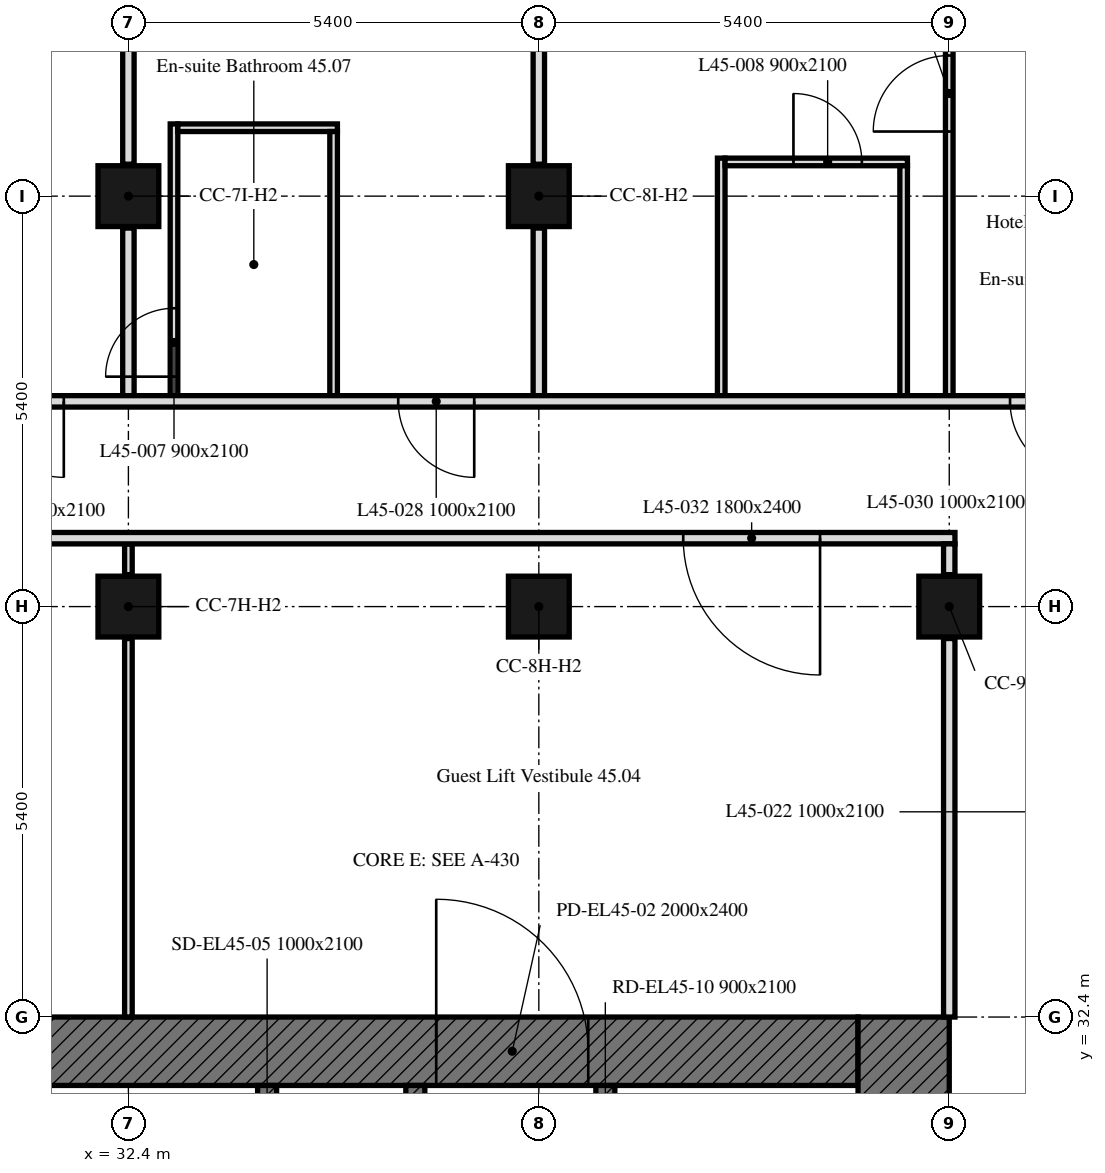
"""IFC4 building model, lengths in metres.
Left out: names, types, materials, properties, quantities, classifications, styles, units other than length and angle.
Written with IfcOpenShell. Run it as: python <this file> out.ifc"""

import sys

from ifc_helpers import new_model, si_unit, direction, frame, frame_2d, origin, origin_2d, place, context, subcontext, project, spatial, rectangle, extrude, element, fill, save


model = new_model("IFC4")
c1 = context("Model", 3, precision=1e-05, world=origin(), true_north=direction((0.0, 1.0)))
c2 = subcontext(c1, "Body", "Model", "MODEL_VIEW")
j1 = project(units=[si_unit("LENGTHUNIT", "METRE"), si_unit("PLANEANGLEUNIT", "RADIAN")], contexts=[c1])
p1 = place(None, origin())
s1 = spatial("IfcSite", under=j1, at=p1, CompositionType="ELEMENT")
p2 = place(p1, origin())
s2 = spatial("IfcBuilding", under=s1, at=p2, CompositionType="ELEMENT")
p3 = place(p2, frame((0.0, 0.0, 187.3)))
s3 = spatial("IfcBuildingStorey", under=s2, at=p3, CompositionType="ELEMENT", Elevation=187.3)
for number, where, z_axis, x_axis in (
    (1, (32.4, 37.8, 0.0), (0.0, 0.0, 1.0), (1.0, 0.0, 0.0)),
    (2, (37.8, 37.8, 0.0), (0.0, 0.0, 1.0), (1.0, 0.0, 0.0)),
    (3, (43.2, 37.8, 0.0), (0.0, 0.0, 1.0), (1.0, 0.0, 0.0)),
    (4, (32.4, 43.2, 0.0), (0.0, 0.0, 1.0), (1.0, 0.0, 0.0)),
    (5, (37.8, 43.2, 0.0), (0.0, 0.0, 1.0), (1.0, 0.0, 0.0)),
):
    element("IfcColumn", number, at=place(p3, frame(where, z_axis=z_axis, x_axis=x_axis)), inside=s3, PredefinedType="COLUMN", context=c2, shape_type="SweptSolid", body=[
        extrude(rectangle(XDim=0.8, YDim=0.8, at=origin_2d()), origin(), (0.0, 0.0, 1.0), 3.0),
    ])
p4 = place(p3, frame((47.901, 43.051, 0.0), z_axis=(0.0, 0.0, 1.0), x_axis=(-0.707106781187, 0.707106781187, 0.0)))
e6 = element("IfcWall", 6, at=p4, inside=s3, PredefinedType="SOLIDWALL", context=c2, shape_type="SweptSolid", body=[
    extrude(rectangle(XDim=6.86, YDim=0.3, at=frame_2d((3.43, 0.0))), origin(), (0.0, 0.0, 1.0), 3.0),
])
p5 = place(p4, frame((1.73, 0.0, 0.9)))
e7 = element("IfcOpeningElement", 7, at=p5, cuts=e6, PredefinedType="OPENING", context=c2, shape_type="SweptSolid", body=[
    extrude(rectangle(XDim=3.4, YDim=1.7, at=frame_2d((1.7, 0.85))), frame((0.0, 0.16, 0.0), z_axis=(0.0, -1.0, 0.0), x_axis=(1.0, 0.0, 0.0)), (0.0, 0.0, 1.0), 0.32),
])
p6 = place(p3, frame((30.9, 31.95, 0.0), z_axis=(0.0, 0.0, 1.0), x_axis=(1.0, 0.0, 0.0)))
e8 = element("IfcWall", 8, at=p6, inside=s3, PredefinedType="SOLIDWALL", context=c2, shape_type="SweptSolid", body=[
    extrude(rectangle(XDim=11.1, YDim=0.9, at=frame_2d((5.55, 0.0))), origin(), (0.0, 0.0, 1.0), 3.0),
])
p7 = place(p6, frame((5.55, 0.0, 0.0)))
e9 = element("IfcOpeningElement", 9, at=p7, cuts=e8, PredefinedType="OPENING", context=c2, shape_type="SweptSolid", body=[
    extrude(rectangle(XDim=2.0, YDim=2.4, at=frame_2d((1.0, 1.2))), frame((0.0, 0.45, 0.0), z_axis=(0.0, -1.0, 0.0), x_axis=(1.0, 0.0, 0.0)), (0.0, 0.0, 1.0), 0.9),
])
p8 = place(p3, frame((42.6, 32.4, 0.0), z_axis=(0.0, 0.0, 1.0), x_axis=(0.0, -1.0, 0.0)))
e10 = element("IfcWall", 10, at=p8, inside=s3, PredefinedType="SOLIDWALL", context=c2, shape_type="SweptSolid", body=[
    extrude(rectangle(XDim=16.2, YDim=1.2, at=frame_2d((8.1, 0.0))), origin(), (0.0, 0.0, 1.0), 3.0),
])
p9 = place(p3, frame((38.675, 17.1, 0.0), z_axis=(0.0, 0.0, 1.0), x_axis=(0.0, 1.0, 0.0)))
e11 = element("IfcWall", 11, at=p9, inside=s3, PredefinedType="SOLIDWALL", context=c2, shape_type="SweptSolid", body=[
    extrude(rectangle(XDim=14.4, YDim=0.25, at=frame_2d((7.2, 0.0))), origin(), (0.0, 0.0, 1.0), 3.0),
])
p10 = place(p9, frame((4.6, 0.0, 0.0)))
e12 = element("IfcOpeningElement", 12, at=p10, cuts=e11, PredefinedType="OPENING", context=c2, shape_type="SweptSolid", body=[
    extrude(rectangle(XDim=1.0, YDim=2.1, at=frame_2d((0.5, 1.05))), frame((0.0, 0.125, 0.0), z_axis=(0.0, -1.0, 0.0), x_axis=(1.0, 0.0, 0.0)), (0.0, 0.0, 1.0), 0.25),
])
p11 = place(p9, frame((7.062, 0.0, 0.0)))
e13 = element("IfcOpeningElement", 13, at=p11, cuts=e11, PredefinedType="OPENING", context=c2, shape_type="SweptSolid", body=[
    extrude(rectangle(XDim=1.2, YDim=2.1, at=frame_2d((0.6, 1.05))), frame((0.0, 0.125, 0.0), z_axis=(0.0, -1.0, 0.0), x_axis=(1.0, 0.0, 0.0)), (0.0, 0.0, 1.0), 0.25),
])
p12 = place(p9, frame((10.36, 0.0, 0.0)))
e14 = element("IfcOpeningElement", 14, at=p12, cuts=e11, PredefinedType="OPENING", context=c2, shape_type="SweptSolid", body=[
    extrude(rectangle(XDim=0.9, YDim=2.1, at=frame_2d((0.45, 1.05))), frame((0.0, 0.125, 0.0), z_axis=(0.0, -1.0, 0.0), x_axis=(1.0, 0.0, 0.0)), (0.0, 0.0, 1.0), 0.25),
])
p13 = place(p9, frame((12.972, 0.0, 0.0)))
e15 = element("IfcOpeningElement", 15, at=p13, cuts=e11, PredefinedType="OPENING", context=c2, shape_type="SweptSolid", body=[
    extrude(rectangle(XDim=0.9, YDim=2.1, at=frame_2d((0.45, 1.05))), frame((0.0, 0.125, 0.0), z_axis=(0.0, -1.0, 0.0), x_axis=(1.0, 0.0, 0.0)), (0.0, 0.0, 1.0), 0.25),
])
p14 = place(p3, frame((34.225, 17.1, 0.0), z_axis=(0.0, 0.0, 1.0), x_axis=(0.0, 1.0, 0.0)))
e16 = element("IfcWall", 16, at=p14, inside=s3, PredefinedType="SOLIDWALL", context=c2, shape_type="SweptSolid", body=[
    extrude(rectangle(XDim=14.4, YDim=0.25, at=frame_2d((7.2, 0.0))), origin(), (0.0, 0.0, 1.0), 3.0),
])
p15 = place(p14, frame((13.15, 0.0, 0.0)))
e17 = element("IfcOpeningElement", 17, at=p15, cuts=e16, PredefinedType="OPENING", context=c2, shape_type="SweptSolid", body=[
    extrude(rectangle(XDim=1.0, YDim=2.1, at=frame_2d((0.5, 1.05))), frame((0.0, 0.125, 0.0), z_axis=(0.0, -1.0, 0.0), x_axis=(1.0, 0.0, 0.0)), (0.0, 0.0, 1.0), 0.25),
])
p16 = place(p14, frame((0.6, 0.0, 0.0)))
e18 = element("IfcOpeningElement", 18, at=p16, cuts=e16, PredefinedType="OPENING", context=c2, shape_type="SweptSolid", body=[
    extrude(rectangle(XDim=1.1, YDim=2.1, at=frame_2d((0.55, 1.05))), frame((0.0, 0.125, 0.0), z_axis=(0.0, -1.0, 0.0), x_axis=(1.0, 0.0, 0.0)), (0.0, 0.0, 1.0), 0.25),
])
p17 = place(p14, frame((3.25, 0.0, 0.0)))
e19 = element("IfcOpeningElement", 19, at=p17, cuts=e16, PredefinedType="OPENING", context=c2, shape_type="SweptSolid", body=[
    extrude(rectangle(XDim=0.9, YDim=2.1, at=frame_2d((0.45, 1.05))), frame((0.0, 0.125, 0.0), z_axis=(0.0, -1.0, 0.0), x_axis=(1.0, 0.0, 0.0)), (0.0, 0.0, 1.0), 0.25),
])
p18 = place(p3, frame((36.175, 29.4, 0.0), z_axis=(0.0, 0.0, 1.0), x_axis=(0.0, 1.0, 0.0)))
e20 = element("IfcWall", 20, at=p18, inside=s3, PredefinedType="SOLIDWALL", context=c2, shape_type="SweptSolid", body=[
    extrude(rectangle(XDim=2.1, YDim=0.25, at=frame_2d((1.05, 0.0))), origin(), (0.0, 0.0, 1.0), 3.0),
])
p19 = place(p18, frame((0.5, 0.0, 0.0)))
e21 = element("IfcOpeningElement", 21, at=p19, cuts=e20, PredefinedType="OPENING", context=c2, shape_type="SweptSolid", body=[
    extrude(rectangle(XDim=1.0, YDim=2.1, at=frame_2d((0.5, 1.05))), frame((0.0, 0.125, 0.0), z_axis=(0.0, -1.0, 0.0), x_axis=(1.0, 0.0, 0.0)), (0.0, 0.0, 1.0), 0.25),
])
p20 = place(p3, frame((32.4, 40.575, 0.0), z_axis=(0.0, 0.0, 1.0), x_axis=(0.0, 1.0, 0.0)))
e22 = element("IfcWall", 22, at=p20, inside=s3, PredefinedType="PARTITIONING", context=c2, shape_type="SweptSolid", body=[
    extrude(rectangle(XDim=2.205, YDim=0.15, at=frame_2d((1.103, 0.0))), origin(), (0.0, 0.0, 1.0), 2.4),
])
p21 = place(p3, frame((32.4, 43.62, 0.0), z_axis=(0.0, 0.0, 1.0), x_axis=(0.0, 1.0, 0.0)))
e23 = element("IfcWall", 23, at=p21, inside=s3, PredefinedType="PARTITIONING", context=c2, shape_type="SweptSolid", body=[
    extrude(rectangle(XDim=4.229, YDim=0.15, at=frame_2d((2.115, 0.0))), origin(), (0.0, 0.0, 1.0), 2.4),
])
p22 = place(p3, frame((33.0, 40.575, 0.0), z_axis=(0.0, 0.0, 1.0), x_axis=(0.0, 1.0, 0.0)))
e24 = element("IfcWall", 24, at=p22, inside=s3, PredefinedType="PARTITIONING", context=c2, shape_type="SweptSolid", body=[
    extrude(rectangle(XDim=3.575, YDim=0.1, at=frame_2d((1.788, 0.0))), origin(), (0.0, 0.0, 1.0), 3.0),
])
p23 = place(p22, frame((0.25, 0.0, 0.0)))
e25 = element("IfcOpeningElement", 25, at=p23, cuts=e24, PredefinedType="OPENING", context=c2, shape_type="SweptSolid", body=[
    extrude(rectangle(XDim=0.9, YDim=2.1, at=frame_2d((0.45, 1.05))), frame((0.0, 0.05, 0.0), z_axis=(0.0, -1.0, 0.0), x_axis=(1.0, 0.0, 0.0)), (0.0, 0.0, 1.0), 0.1),
])
p24 = place(p3, frame((33.05, 44.1, 0.0), z_axis=(0.0, 0.0, 1.0), x_axis=(1.0, 0.0, 0.0)))
e26 = element("IfcWall", 26, at=p24, inside=s3, PredefinedType="PARTITIONING", context=c2, shape_type="SweptSolid", body=[
    extrude(rectangle(XDim=2.1, YDim=0.1, at=frame_2d((1.05, 0.0))), origin(), (0.0, 0.0, 1.0), 3.0),
])
p25 = place(p3, frame((35.1, 44.05, 0.0), z_axis=(0.0, 0.0, 1.0), x_axis=(0.0, -1.0, 0.0)))
e27 = element("IfcWall", 27, at=p25, inside=s3, PredefinedType="PARTITIONING", context=c2, shape_type="SweptSolid", body=[
    extrude(rectangle(XDim=3.475, YDim=0.1, at=frame_2d((1.738, 0.0))), origin(), (0.0, 0.0, 1.0), 3.0),
])
p26 = place(p3, frame((37.8, 40.575, 0.0), z_axis=(0.0, 0.0, 1.0), x_axis=(0.0, 1.0, 0.0)))
e28 = element("IfcWall", 28, at=p26, inside=s3, PredefinedType="PARTITIONING", context=c2, shape_type="SweptSolid", body=[
    extrude(rectangle(XDim=2.205, YDim=0.15, at=frame_2d((1.103, 0.0))), origin(), (0.0, 0.0, 1.0), 2.4),
])
p27 = place(p3, frame((37.8, 43.62, 0.0), z_axis=(0.0, 0.0, 1.0), x_axis=(0.0, 1.0, 0.0)))
e29 = element("IfcWall", 29, at=p27, inside=s3, PredefinedType="PARTITIONING", context=c2, shape_type="SweptSolid", body=[
    extrude(rectangle(XDim=4.229, YDim=0.15, at=frame_2d((2.115, 0.0))), origin(), (0.0, 0.0, 1.0), 2.4),
])
p28 = place(p3, frame((40.2, 40.575, 0.0), z_axis=(0.0, 0.0, 1.0), x_axis=(0.0, 1.0, 0.0)))
e30 = element("IfcWall", 30, at=p28, inside=s3, PredefinedType="PARTITIONING", context=c2, shape_type="SweptSolid", body=[
    extrude(rectangle(XDim=3.125, YDim=0.1, at=frame_2d((1.562, 0.0))), origin(), (0.0, 0.0, 1.0), 3.0),
])
p29 = place(p3, frame((40.25, 43.65, 0.0), z_axis=(0.0, 0.0, 1.0), x_axis=(1.0, 0.0, 0.0)))
e31 = element("IfcWall", 31, at=p29, inside=s3, PredefinedType="PARTITIONING", context=c2, shape_type="SweptSolid", body=[
    extrude(rectangle(XDim=2.4, YDim=0.1, at=frame_2d((1.2, 0.0))), origin(), (0.0, 0.0, 1.0), 3.0),
])
p30 = place(p29, frame((0.9, 0.0, 0.0)))
e32 = element("IfcOpeningElement", 32, at=p30, cuts=e31, PredefinedType="OPENING", context=c2, shape_type="SweptSolid", body=[
    extrude(rectangle(XDim=0.9, YDim=2.1, at=frame_2d((0.45, 1.05))), frame((0.0, 0.05, 0.0), z_axis=(0.0, -1.0, 0.0), x_axis=(1.0, 0.0, 0.0)), (0.0, 0.0, 1.0), 0.1),
])
p31 = place(p3, frame((42.6, 43.6, 0.0), z_axis=(0.0, 0.0, 1.0), x_axis=(0.0, -1.0, 0.0)))
e33 = element("IfcWall", 33, at=p31, inside=s3, PredefinedType="PARTITIONING", context=c2, shape_type="SweptSolid", body=[
    extrude(rectangle(XDim=3.025, YDim=0.1, at=frame_2d((1.513, 0.0))), origin(), (0.0, 0.0, 1.0), 3.0),
])
p32 = place(p3, frame((43.2, 40.575, 0.0), z_axis=(0.0, 0.0, 1.0), x_axis=(0.0, 1.0, 0.0)))
e34 = element("IfcWall", 34, at=p32, inside=s3, PredefinedType="PARTITIONING", context=c2, shape_type="SweptSolid", body=[
    extrude(rectangle(XDim=6.913, YDim=0.1, at=frame_2d((3.457, 0.0))), origin(), (0.0, 0.0, 1.0), 3.0),
])
p33 = place(p32, frame((3.475, 0.0, 0.0)))
e35 = element("IfcOpeningElement", 35, at=p33, cuts=e34, PredefinedType="OPENING", context=c2, shape_type="SweptSolid", body=[
    extrude(rectangle(XDim=1.0, YDim=2.1, at=frame_2d((0.5, 1.05))), frame((0.0, 0.05, 0.0), z_axis=(0.0, -1.0, 0.0), x_axis=(1.0, 0.0, 0.0)), (0.0, 0.0, 1.0), 0.1),
])
p34 = place(p3, frame((47.849, 40.5, 0.0), z_axis=(0.0, 0.0, 1.0), x_axis=(-1.0, 0.0, 0.0)))
e36 = element("IfcWall", 36, at=p34, inside=s3, PredefinedType="PARTITIONING", context=c2, shape_type="SweptSolid", body=[
    extrude(rectangle(XDim=41.698, YDim=0.15, at=frame_2d((20.849, 0.0))), origin(), (0.0, 0.0, 1.0), 2.4),
])
p35 = place(p34, frame((37.899, 0.0, 0.0)))
e37 = element("IfcOpeningElement", 37, at=p35, cuts=e36, PredefinedType="OPENING", context=c2, shape_type="SweptSolid", body=[
    extrude(rectangle(XDim=1.0, YDim=2.1, at=frame_2d((0.5, 1.05))), frame((0.0, 0.075, 0.0), z_axis=(0.0, -1.0, 0.0), x_axis=(1.0, 0.0, 0.0)), (0.0, 0.0, 1.0), 0.15),
])
p36 = place(p34, frame((32.499, 0.0, 0.0)))
e38 = element("IfcOpeningElement", 38, at=p36, cuts=e36, PredefinedType="OPENING", context=c2, shape_type="SweptSolid", body=[
    extrude(rectangle(XDim=1.0, YDim=2.1, at=frame_2d((0.5, 1.05))), frame((0.0, 0.075, 0.0), z_axis=(0.0, -1.0, 0.0), x_axis=(1.0, 0.0, 0.0)), (0.0, 0.0, 1.0), 0.15),
])
p37 = place(p34, frame((27.099, 0.0, 0.0)))
e39 = element("IfcOpeningElement", 39, at=p37, cuts=e36, PredefinedType="OPENING", context=c2, shape_type="SweptSolid", body=[
    extrude(rectangle(XDim=1.0, YDim=2.1, at=frame_2d((0.5, 1.05))), frame((0.0, 0.075, 0.0), z_axis=(0.0, -1.0, 0.0), x_axis=(1.0, 0.0, 0.0)), (0.0, 0.0, 1.0), 0.15),
])
p38 = place(p34, frame((21.699, 0.0, 0.0)))
e40 = element("IfcOpeningElement", 40, at=p38, cuts=e36, PredefinedType="OPENING", context=c2, shape_type="SweptSolid", body=[
    extrude(rectangle(XDim=1.0, YDim=2.1, at=frame_2d((0.5, 1.05))), frame((0.0, 0.075, 0.0), z_axis=(0.0, -1.0, 0.0), x_axis=(1.0, 0.0, 0.0)), (0.0, 0.0, 1.0), 0.15),
])
p39 = place(p34, frame((16.299, 0.0, 0.0)))
e41 = element("IfcOpeningElement", 41, at=p39, cuts=e36, PredefinedType="OPENING", context=c2, shape_type="SweptSolid", body=[
    extrude(rectangle(XDim=1.0, YDim=2.1, at=frame_2d((0.5, 1.05))), frame((0.0, 0.075, 0.0), z_axis=(0.0, -1.0, 0.0), x_axis=(1.0, 0.0, 0.0)), (0.0, 0.0, 1.0), 0.15),
])
p40 = place(p34, frame((10.899, 0.0, 0.0)))
e42 = element("IfcOpeningElement", 42, at=p40, cuts=e36, PredefinedType="OPENING", context=c2, shape_type="SweptSolid", body=[
    extrude(rectangle(XDim=1.0, YDim=2.1, at=frame_2d((0.5, 1.05))), frame((0.0, 0.075, 0.0), z_axis=(0.0, -1.0, 0.0), x_axis=(1.0, 0.0, 0.0)), (0.0, 0.0, 1.0), 0.15),
])
p41 = place(p34, frame((2.849, 0.0, 0.0)))
e43 = element("IfcOpeningElement", 43, at=p41, cuts=e36, PredefinedType="OPENING", context=c2, shape_type="SweptSolid", body=[
    extrude(rectangle(XDim=1.0, YDim=2.1, at=frame_2d((0.5, 1.05))), frame((0.0, 0.075, 0.0), z_axis=(0.0, -1.0, 0.0), x_axis=(1.0, 0.0, 0.0)), (0.0, 0.0, 1.0), 0.15),
])
p42 = place(p3, frame((32.4, 32.4, 0.0), z_axis=(0.0, 0.0, 1.0), x_axis=(0.0, 1.0, 0.0)))
e44 = element("IfcWall", 44, at=p42, inside=s3, PredefinedType="PARTITIONING", context=c2, shape_type="SweptSolid", body=[
    extrude(rectangle(XDim=4.98, YDim=0.1, at=frame_2d((2.49, 0.0))), origin(), (0.0, 0.0, 1.0), 2.4),
])
p43 = place(p3, frame((32.4, 38.22, 0.0), z_axis=(0.0, 0.0, 1.0), x_axis=(0.0, 1.0, 0.0)))
e45 = element("IfcWall", 45, at=p43, inside=s3, PredefinedType="PARTITIONING", context=c2, shape_type="SweptSolid", body=[
    extrude(rectangle(XDim=0.405, YDim=0.1, at=frame_2d((0.203, 0.0))), origin(), (0.0, 0.0, 1.0), 2.4),
])
p44 = place(p3, frame((43.275, 38.7, 0.0), z_axis=(0.0, 0.0, 1.0), x_axis=(-1.0, 0.0, 0.0)))
e46 = element("IfcWall", 46, at=p44, inside=s3, PredefinedType="PARTITIONING", context=c2, shape_type="SweptSolid", body=[
    extrude(rectangle(XDim=37.124, YDim=0.15, at=frame_2d((18.562, 0.0))), origin(), (0.0, 0.0, 1.0), 2.4),
])
p45 = place(p44, frame((18.475, 0.0, 0.0)))
e47 = element("IfcOpeningElement", 47, at=p45, cuts=e46, PredefinedType="OPENING", context=c2, shape_type="SweptSolid", body=[
    extrude(rectangle(XDim=1.0, YDim=2.1, at=frame_2d((0.5, 1.05))), frame((0.0, 0.075, 0.0), z_axis=(0.0, -1.0, 0.0), x_axis=(1.0, 0.0, 0.0)), (0.0, 0.0, 1.0), 0.15),
])
p46 = place(p44, frame((28.775, 0.0, 0.0)))
e48 = element("IfcOpeningElement", 48, at=p46, cuts=e46, PredefinedType="OPENING", context=c2, shape_type="SweptSolid", body=[
    extrude(rectangle(XDim=1.8, YDim=2.4, at=frame_2d((0.9, 1.2))), frame((0.0, 0.075, 0.0), z_axis=(0.0, -1.0, 0.0), x_axis=(1.0, 0.0, 0.0)), (0.0, 0.0, 1.0), 0.15),
])
p47 = place(p44, frame((1.775, 0.0, 0.0)))
e49 = element("IfcOpeningElement", 49, at=p47, cuts=e46, PredefinedType="OPENING", context=c2, shape_type="SweptSolid", body=[
    extrude(rectangle(XDim=1.8, YDim=2.4, at=frame_2d((0.9, 1.2))), frame((0.0, 0.075, 0.0), z_axis=(0.0, -1.0, 0.0), x_axis=(1.0, 0.0, 0.0)), (0.0, 0.0, 1.0), 0.15),
])
p48 = place(p3, frame((43.2, 32.4, 0.0), z_axis=(0.0, 0.0, 1.0), x_axis=(0.0, 1.0, 0.0)))
e50 = element("IfcWall", 50, at=p48, inside=s3, PredefinedType="PARTITIONING", context=c2, shape_type="SweptSolid", body=[
    extrude(rectangle(XDim=4.98, YDim=0.15, at=frame_2d((2.49, 0.0))), origin(), (0.0, 0.0, 1.0), 3.0),
])
p49 = place(p3, frame((43.2, 38.22, 0.0), z_axis=(0.0, 0.0, 1.0), x_axis=(0.0, 1.0, 0.0)))
e51 = element("IfcWall", 51, at=p49, inside=s3, PredefinedType="PARTITIONING", context=c2, shape_type="SweptSolid", body=[
    extrude(rectangle(XDim=0.405, YDim=0.15, at=frame_2d((0.203, 0.0))), origin(), (0.0, 0.0, 1.0), 3.0),
])
p50 = place(p7, origin())
e52 = element("IfcDoor", 52, at=p50, inside=s3, OperationType="DOUBLE_DOOR_SINGLE_SWING", PredefinedType="DOOR", context=c2, shape_type="SweptSolid", body=[
    extrude(rectangle(XDim=2.0, YDim=2.4, at=frame_2d((1.0, 1.2))), frame((0.0, 0.025, 0.0), z_axis=(0.0, -1.0, 0.0), x_axis=(1.0, 0.0, 0.0)), (0.0, 0.0, 1.0), 0.05),
])
fill(e9, e52)
p51 = place(p23, origin())
e53 = element("IfcDoor", 53, at=p51, inside=s3, OperationType="SINGLE_SWING_RIGHT", PredefinedType="DOOR", context=c2, shape_type="SweptSolid", body=[
    extrude(rectangle(XDim=0.9, YDim=2.1, at=frame_2d((0.45, 1.05))), frame((0.0, 0.025, 0.0), z_axis=(0.0, -1.0, 0.0), x_axis=(1.0, 0.0, 0.0)), (0.0, 0.0, 1.0), 0.05),
])
fill(e25, e53)
p52 = place(p30, origin())
e54 = element("IfcDoor", 54, at=p52, inside=s3, OperationType="SINGLE_SWING_LEFT", PredefinedType="DOOR", context=c2, shape_type="SweptSolid", body=[
    extrude(rectangle(XDim=0.9, YDim=2.1, at=frame_2d((0.45, 1.05))), frame((0.0, 0.025, 0.0), z_axis=(0.0, -1.0, 0.0), x_axis=(1.0, 0.0, 0.0)), (0.0, 0.0, 1.0), 0.05),
])
fill(e32, e54)
p53 = place(p39, origin())
e55 = element("IfcDoor", 55, at=p53, inside=s3, OperationType="SINGLE_SWING_RIGHT", PredefinedType="DOOR", context=c2, shape_type="SweptSolid", body=[
    extrude(rectangle(XDim=1.0, YDim=2.1, at=frame_2d((0.5, 1.05))), frame((0.0, 0.025, 0.0), z_axis=(0.0, -1.0, 0.0), x_axis=(1.0, 0.0, 0.0)), (0.0, 0.0, 1.0), 0.05),
])
fill(e41, e55)
p54 = place(p40, origin())
e56 = element("IfcDoor", 56, at=p54, inside=s3, OperationType="SINGLE_SWING_LEFT", PredefinedType="DOOR", context=c2, shape_type="SweptSolid", body=[
    extrude(rectangle(XDim=1.0, YDim=2.1, at=frame_2d((0.5, 1.05))), frame((0.0, 0.025, 0.0), z_axis=(0.0, -1.0, 0.0), x_axis=(1.0, 0.0, 0.0)), (0.0, 0.0, 1.0), 0.05),
])
fill(e42, e56)
p55 = place(p33, origin())
e57 = element("IfcDoor", 57, at=p55, inside=s3, OperationType="SINGLE_SWING_LEFT", PredefinedType="DOOR", context=c2, shape_type="SweptSolid", body=[
    extrude(rectangle(XDim=1.0, YDim=2.1, at=frame_2d((0.5, 1.05))), frame((0.0, 0.025, 0.0), z_axis=(0.0, -1.0, 0.0), x_axis=(1.0, 0.0, 0.0)), (0.0, 0.0, 1.0), 0.05),
])
fill(e35, e57)
p56 = place(p41, origin())
e58 = element("IfcDoor", 58, at=p56, inside=s3, OperationType="SINGLE_SWING_RIGHT", PredefinedType="DOOR", context=c2, shape_type="SweptSolid", body=[
    extrude(rectangle(XDim=1.0, YDim=2.1, at=frame_2d((0.5, 1.05))), frame((0.0, 0.025, 0.0), z_axis=(0.0, -1.0, 0.0), x_axis=(1.0, 0.0, 0.0)), (0.0, 0.0, 1.0), 0.05),
])
fill(e43, e58)
p57 = place(p47, origin())
e59 = element("IfcDoor", 59, at=p57, inside=s3, OperationType="DOUBLE_DOOR_SINGLE_SWING", PredefinedType="DOOR", context=c2, shape_type="SweptSolid", body=[
    extrude(rectangle(XDim=1.8, YDim=2.4, at=frame_2d((0.9, 1.2))), frame((0.0, 0.025, 0.0), z_axis=(0.0, -1.0, 0.0), x_axis=(1.0, 0.0, 0.0)), (0.0, 0.0, 1.0), 0.05),
])
fill(e49, e59)
save(model, sys.argv[1])
